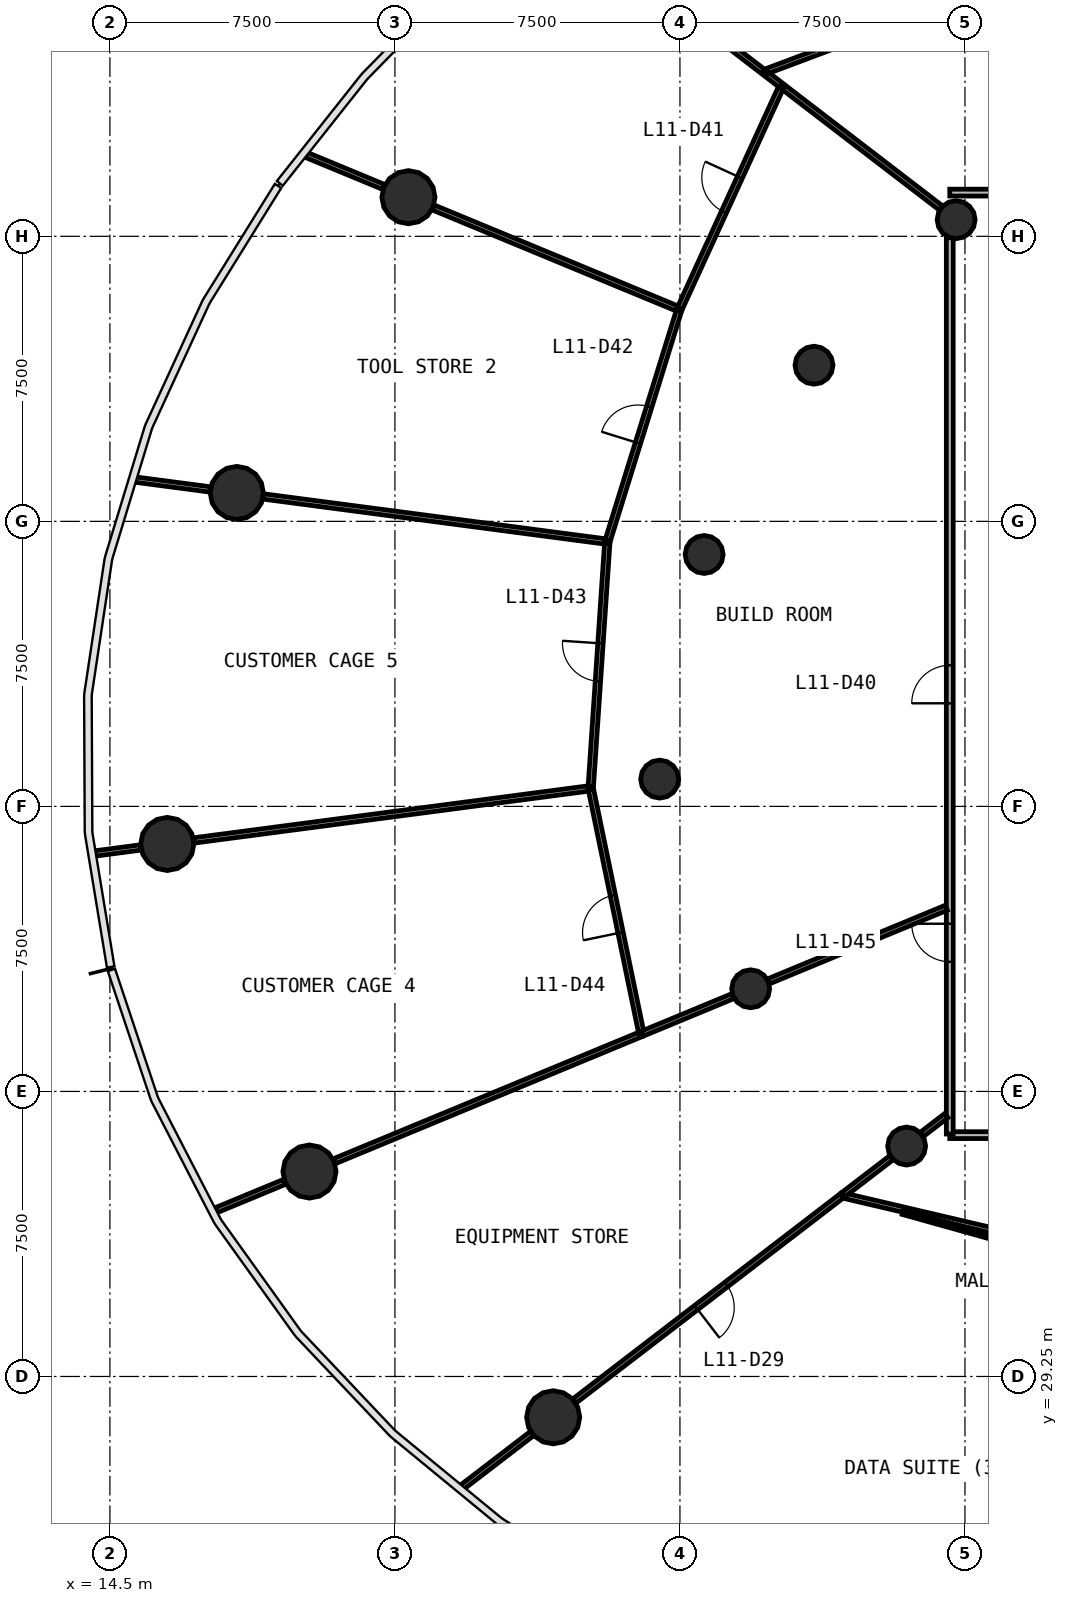
"""IFC4 building model, lengths in metres.
Left out: names, types, materials, properties, quantities, classifications, styles, units other than length and angle.
Written with IfcOpenShell. Run it as: python <this file> out.ifc"""

import sys

from ifc_helpers import new_model, si_unit, direction, frame, frame_2d, origin, origin_2d, place, context, subcontext, project, spatial, rectangle, circle, extrude, source, transform, mapped, element, fill, save


model = new_model("IFC4")
c1 = context("Model", 3, precision=1e-05, world=origin(), true_north=direction((0.0, 1.0)))
c2 = subcontext(c1, "Body", "Model", "MODEL_VIEW")
j1 = project(units=[si_unit("LENGTHUNIT", "METRE"), si_unit("PLANEANGLEUNIT", "RADIAN")], contexts=[c1])
p1 = place(None, origin())
s1 = spatial("IfcSite", under=j1, at=p1, CompositionType="ELEMENT")
p2 = place(p1, origin())
s2 = spatial("IfcBuilding", under=s1, at=p2, CompositionType="ELEMENT")
p3 = place(p2, frame((0.0, 0.0, 49.0)))
s3 = spatial("IfcBuildingStorey", under=s2, at=p3, CompositionType="ELEMENT", Elevation=49.0)
m1 = source(origin(), c2, "Body", "SweptSolid", [
    extrude(circle(Radius=0.7, at=origin_2d()), origin(), (0.0, 0.0, 1.0), 4.4),
])
for number, where, z_axis, x_axis in (
    (1, (22.355, 60.279, 0.0), (0.0, 0.0, 1.0), (1.0, 0.0, 0.0)),
    (2, (17.839, 52.497, 0.0), (0.0, 0.0, 1.0), (1.0, 0.0, 0.0)),
    (3, (16.01, 43.262, 0.0), (0.0, 0.0, 1.0), (1.0, 0.0, 0.0)),
    (4, (19.751, 34.642, 0.0), (0.0, 0.0, 1.0), (1.0, 0.0, 0.0)),
    (5, (26.164, 28.176, 0.0), (0.0, 0.0, 1.0), (1.0, 0.0, 0.0)),
):
    element("IfcColumn", number, at=place(p3, frame(where, z_axis=z_axis, x_axis=x_axis)), inside=s3, PredefinedType="COLUMN", context=c2, shape_type="MappedRepresentation", body=[
        mapped(m1, transform((0.0, 0.0, 0.0), scale=1.0)),
    ])
m2 = source(origin(), c2, "Body", "SweptSolid", [
    extrude(circle(Radius=0.5, at=origin_2d()), origin(), (0.0, 0.0, 1.0), 4.4),
])
for number, where, z_axis, x_axis in (
    (6, (36.768, 59.688, 0.0), (0.0, 0.0, 1.0), (1.0, 0.0, 0.0)),
    (7, (33.028, 55.859, 0.0), (0.0, 0.0, 1.0), (1.0, 0.0, 0.0)),
    (8, (30.137, 50.878, 0.0), (0.0, 0.0, 1.0), (1.0, 0.0, 0.0)),
    (9, (28.966, 44.968, 0.0), (0.0, 0.0, 1.0), (1.0, 0.0, 0.0)),
    (10, (31.361, 39.451, 0.0), (0.0, 0.0, 1.0), (1.0, 0.0, 0.0)),
    (11, (35.465, 35.312, 0.0), (0.0, 0.0, 1.0), (1.0, 0.0, 0.0)),
):
    element("IfcColumn", number, at=place(p3, frame(where, z_axis=z_axis, x_axis=x_axis)), inside=s3, PredefinedType="COLUMN", context=c2, shape_type="MappedRepresentation", body=[
        mapped(m2, transform((0.0, 0.0, 0.0), scale=1.0)),
    ])
p4 = place(p3, frame((67.4, 35.6, 0.0), z_axis=(0.0, 0.0, 1.0), x_axis=(-1.0, 0.0, 0.0)))
e12 = element("IfcWall", 12, at=p4, inside=s3, PredefinedType="PARTITIONING", context=c2, shape_type="SweptSolid", body=[
    extrude(rectangle(XDim=30.8, YDim=0.18, at=frame_2d((15.4, 0.0))), origin(), (0.0, 0.0, 1.0), 3.05),
])
p5 = place(p4, frame((27.45, 0.0, 0.0)))
e13 = element("IfcOpeningElement", 13, at=p5, cuts=e12, PredefinedType="OPENING", context=c2, shape_type="SweptSolid", body=[
    extrude(rectangle(XDim=0.9, YDim=2.1, at=frame_2d((0.45, 1.05))), frame((0.0, 0.1, 0.0), z_axis=(0.0, -1.0, 0.0), x_axis=(1.0, 0.0, 0.0)), (0.0, 0.0, 1.0), 0.2),
])
p6 = place(p4, frame((23.85, 0.0, 0.0)))
e14 = element("IfcOpeningElement", 14, at=p6, cuts=e12, PredefinedType="OPENING", context=c2, shape_type="SweptSolid", body=[
    extrude(rectangle(XDim=0.9, YDim=2.1, at=frame_2d((0.45, 1.05))), frame((0.0, 0.1, 0.0), z_axis=(0.0, -1.0, 0.0), x_axis=(1.0, 0.0, 0.0)), (0.0, 0.0, 1.0), 0.2),
])
p7 = place(p4, frame((20.85, 0.0, 0.0)))
e15 = element("IfcOpeningElement", 15, at=p7, cuts=e12, PredefinedType="OPENING", context=c2, shape_type="SweptSolid", body=[
    extrude(rectangle(XDim=0.9, YDim=2.1, at=frame_2d((0.45, 1.05))), frame((0.0, 0.1, 0.0), z_axis=(0.0, -1.0, 0.0), x_axis=(1.0, 0.0, 0.0)), (0.0, 0.0, 1.0), 0.2),
])
p8 = place(p4, frame((14.95, 0.0, 0.0)))
e16 = element("IfcOpeningElement", 16, at=p8, cuts=e12, PredefinedType="OPENING", context=c2, shape_type="SweptSolid", body=[
    extrude(rectangle(XDim=1.0, YDim=2.1, at=frame_2d((0.5, 1.05))), frame((0.0, 0.1, 0.0), z_axis=(0.0, -1.0, 0.0), x_axis=(1.0, 0.0, 0.0)), (0.0, 0.0, 1.0), 0.2),
])
p9 = place(p3, frame((36.6, 60.4, 0.0), z_axis=(0.0, 0.0, 1.0), x_axis=(1.0, 0.0, 0.0)))
e17 = element("IfcWall", 17, at=p9, inside=s3, PredefinedType="PARTITIONING", context=c2, shape_type="SweptSolid", body=[
    extrude(rectangle(XDim=30.8, YDim=0.18, at=frame_2d((15.4, 0.0))), origin(), (0.0, 0.0, 1.0), 3.05),
])
p10 = place(p9, frame((20.95, 0.0, 0.0)))
e18 = element("IfcOpeningElement", 18, at=p10, cuts=e17, PredefinedType="OPENING", context=c2, shape_type="SweptSolid", body=[
    extrude(rectangle(XDim=1.0, YDim=2.1, at=frame_2d((0.5, 1.05))), frame((0.0, 0.1, 0.0), z_axis=(0.0, -1.0, 0.0), x_axis=(1.0, 0.0, 0.0)), (0.0, 0.0, 1.0), 0.2),
])
p11 = place(p9, frame((17.35, 0.0, 0.0)))
e19 = element("IfcOpeningElement", 19, at=p11, cuts=e17, PredefinedType="OPENING", context=c2, shape_type="SweptSolid", body=[
    extrude(rectangle(XDim=1.0, YDim=2.1, at=frame_2d((0.5, 1.05))), frame((0.0, 0.1, 0.0), z_axis=(0.0, -1.0, 0.0), x_axis=(1.0, 0.0, 0.0)), (0.0, 0.0, 1.0), 0.2),
])
p12 = place(p9, frame((14.95, 0.0, 0.0)))
e20 = element("IfcOpeningElement", 20, at=p12, cuts=e17, PredefinedType="OPENING", context=c2, shape_type="SweptSolid", body=[
    extrude(rectangle(XDim=1.0, YDim=2.1, at=frame_2d((0.5, 1.05))), frame((0.0, 0.1, 0.0), z_axis=(0.0, -1.0, 0.0), x_axis=(1.0, 0.0, 0.0)), (0.0, 0.0, 1.0), 0.2),
])
p13 = place(p3, frame((36.6, 35.63, 0.0), z_axis=(0.0, 0.0, 1.0), x_axis=(0.0, 1.0, 0.0)))
e21 = element("IfcWall", 21, at=p13, inside=s3, PredefinedType="PARTITIONING", context=c2, shape_type="SweptSolid", body=[
    extrude(rectangle(XDim=23.583, YDim=0.18, at=frame_2d((11.791, 0.0))), origin(), (0.0, 0.0, 1.0), 3.05),
])
p14 = place(p13, frame((11.333, 0.0, 0.0)))
e22 = element("IfcOpeningElement", 22, at=p14, cuts=e21, PredefinedType="OPENING", context=c2, shape_type="SweptSolid", body=[
    extrude(rectangle(XDim=1.0, YDim=2.1, at=frame_2d((0.5, 1.05))), frame((0.0, 0.1, 0.0), z_axis=(0.0, -1.0, 0.0), x_axis=(1.0, 0.0, 0.0)), (0.0, 0.0, 1.0), 0.2),
])
p15 = place(p13, frame((4.532, 0.0, 0.0)))
e23 = element("IfcOpeningElement", 23, at=p15, cuts=e21, PredefinedType="OPENING", context=c2, shape_type="SweptSolid", body=[
    extrude(rectangle(XDim=1.0, YDim=2.1, at=frame_2d((0.5, 1.05))), frame((0.0, 0.1, 0.0), z_axis=(0.0, -1.0, 0.0), x_axis=(1.0, 0.0, 0.0)), (0.0, 0.0, 1.0), 0.2),
])
p16 = place(p3, frame((27.151, 44.729, 0.0), z_axis=(0.0, 0.0, 1.0), x_axis=(-0.991445773007, -0.130519267494, 0.0)))
e24 = element("IfcWall", 24, at=p16, inside=s3, PredefinedType="PARTITIONING", context=c2, shape_type="SweptSolid", body=[
    extrude(rectangle(XDim=10.533, YDim=0.14, at=frame_2d((5.267, 0.0))), origin(), (0.0, 0.0, 1.0), 3.05),
])
p17 = place(p3, frame((27.59, 51.214, 0.0), z_axis=(0.0, 0.0, 1.0), x_axis=(-0.991443735441, 0.13053474424, 0.0)))
e25 = element("IfcWall", 25, at=p17, inside=s3, PredefinedType="PARTITIONING", context=c2, shape_type="SweptSolid", body=[
    extrude(rectangle(XDim=9.131, YDim=0.14, at=frame_2d((4.565, 0.0))), origin(), (0.0, 0.0, 1.0), 3.05),
])
p18 = place(p3, frame((33.776, 34.016, 0.0), z_axis=(0.0, 0.0, 1.0), x_axis=(-0.793363616038, -0.608748037161, 0.0)))
e26 = element("IfcWall", 26, at=p18, inside=s3, PredefinedType="PARTITIONING", context=c2, shape_type="SweptSolid", body=[
    extrude(rectangle(XDim=8.889, YDim=0.14, at=frame_2d((4.445, 0.0))), origin(), (0.0, 0.0, 1.0), 3.05),
])
p19 = place(p18, frame((3.85, 0.0, 0.0)))
e27 = element("IfcOpeningElement", 27, at=p19, cuts=e26, PredefinedType="OPENING", context=c2, shape_type="SweptSolid", body=[
    extrude(rectangle(XDim=1.0, YDim=2.1, at=frame_2d((0.5, 1.05))), frame((0.0, 0.08, 0.0), z_axis=(0.0, -1.0, 0.0), x_axis=(1.0, 0.0, 0.0)), (0.0, 0.0, 1.0), 0.16),
])
p20 = place(p3, frame((28.489, 38.261, 0.0), z_axis=(0.0, 0.0, 1.0), x_axis=(-0.923879491354, -0.382683531727, 0.0)))
e28 = element("IfcWall", 28, at=p20, inside=s3, PredefinedType="PARTITIONING", context=c2, shape_type="SweptSolid", body=[
    extrude(rectangle(XDim=8.753, YDim=0.14, at=frame_2d((4.376, 0.0))), origin(), (0.0, 0.0, 1.0), 3.05),
])
p21 = place(p3, frame((29.484, 57.326, 0.0), z_axis=(0.0, 0.0, 1.0), x_axis=(-0.923878476662, 0.3826859814, 0.0)))
e29 = element("IfcWall", 29, at=p21, inside=s3, PredefinedType="PARTITIONING", context=c2, shape_type="SweptSolid", body=[
    extrude(rectangle(XDim=7.011, YDim=0.14, at=frame_2d((3.506, 0.0))), origin(), (0.0, 0.0, 1.0), 3.05),
])
p22 = place(p3, frame((38.19, 65.998, 0.0), z_axis=(0.0, 0.0, 1.0), x_axis=(-0.936297270661, -0.35120851492, 0.0)))
e30 = element("IfcWall", 30, at=p22, inside=s3, PredefinedType="PARTITIONING", context=c2, shape_type="SweptSolid", body=[
    extrude(rectangle(XDim=6.919, YDim=0.14, at=frame_2d((3.459, 0.0))), origin(), (0.0, 0.0, 1.0), 3.05),
])
p23 = place(p3, frame((28.483, 38.291, 0.0), z_axis=(0.0, 0.0, 1.0), x_axis=(-0.202647546794, 0.979251740758, 0.0)))
e31 = element("IfcWall", 31, at=p23, inside=s3, PredefinedType="PARTITIONING", context=c2, shape_type="SweptSolid", body=[
    extrude(rectangle(XDim=6.544, YDim=0.14, at=frame_2d((3.272, 0.0))), origin(), (0.0, 0.0, 1.0), 3.05),
])
p24 = place(p23, frame((2.694, 0.0, 0.0)))
e32 = element("IfcOpeningElement", 32, at=p24, cuts=e31, PredefinedType="OPENING", context=c2, shape_type="SweptSolid", body=[
    extrude(rectangle(XDim=1.0, YDim=2.1, at=frame_2d((0.5, 1.05))), frame((0.0, 0.08, 0.0), z_axis=(0.0, -1.0, 0.0), x_axis=(1.0, 0.0, 0.0)), (0.0, 0.0, 1.0), 0.16),
])
p25 = place(p3, frame((27.153, 44.759, 0.0), z_axis=(0.0, 0.0, 1.0), x_axis=(0.067555628739, 0.997715509063, 0.0)))
e33 = element("IfcWall", 33, at=p25, inside=s3, PredefinedType="PARTITIONING", context=c2, shape_type="SweptSolid", body=[
    extrude(rectangle(XDim=6.44, YDim=0.14, at=frame_2d((3.22, 0.0))), origin(), (0.0, 0.0, 1.0), 3.05),
])
p26 = place(p25, frame((2.79, 0.0, 0.0)))
e34 = element("IfcOpeningElement", 34, at=p26, cuts=e33, PredefinedType="OPENING", context=c2, shape_type="SweptSolid", body=[
    extrude(rectangle(XDim=1.0, YDim=2.1, at=frame_2d((0.5, 1.05))), frame((0.0, 0.08, 0.0), z_axis=(0.0, -1.0, 0.0), x_axis=(1.0, 0.0, 0.0)), (0.0, 0.0, 1.0), 0.16),
])
p27 = place(p3, frame((29.497, 57.354, 0.0), z_axis=(0.0, 0.0, 1.0), x_axis=(0.416308805512, 0.909223283057, 0.0)))
e35 = element("IfcWall", 35, at=p27, inside=s3, PredefinedType="PARTITIONING", context=c2, shape_type="SweptSolid", body=[
    extrude(rectangle(XDim=6.441, YDim=0.14, at=frame_2d((3.22, 0.0))), origin(), (0.0, 0.0, 1.0), 3.05),
])
p28 = place(p27, frame((2.791, 0.0, 0.0)))
e36 = element("IfcOpeningElement", 36, at=p28, cuts=e35, PredefinedType="OPENING", context=c2, shape_type="SweptSolid", body=[
    extrude(rectangle(XDim=1.0, YDim=2.1, at=frame_2d((0.5, 1.05))), frame((0.0, 0.08, 0.0), z_axis=(0.0, -1.0, 0.0), x_axis=(1.0, 0.0, 0.0)), (0.0, 0.0, 1.0), 0.16),
])
p29 = place(p3, frame((27.599, 51.242, 0.0), z_axis=(0.0, 0.0, 1.0), x_axis=(0.296066096507, 0.95516745469, 0.0)))
e37 = element("IfcWall", 37, at=p29, inside=s3, PredefinedType="PARTITIONING", context=c2, shape_type="SweptSolid", body=[
    extrude(rectangle(XDim=6.34, YDim=0.14, at=frame_2d((3.17, 0.0))), origin(), (0.0, 0.0, 1.0), 3.05),
])
p30 = place(p29, frame((2.689, 0.0, 0.0)))
e38 = element("IfcOpeningElement", 38, at=p30, cuts=e37, PredefinedType="OPENING", context=c2, shape_type="SweptSolid", body=[
    extrude(rectangle(XDim=1.0, YDim=2.1, at=frame_2d((0.5, 1.05))), frame((0.0, 0.08, 0.0), z_axis=(0.0, -1.0, 0.0), x_axis=(1.0, 0.0, 0.0)), (0.0, 0.0, 1.0), 0.16),
])
p31 = place(p3, frame((33.805, 34.009, 0.0), z_axis=(0.0, 0.0, 1.0), x_axis=(0.973632222489, -0.22812342127, 0.0)))
e39 = element("IfcWall", 39, at=p31, inside=s3, PredefinedType="PARTITIONING", context=c2, shape_type="SweptSolid", body=[
    extrude(rectangle(XDim=6.018, YDim=0.14, at=frame_2d((3.009, 0.0))), origin(), (0.0, 0.0, 1.0), 3.05),
])
p32 = place(p3, frame((36.367, 59.995, 0.0), z_axis=(0.0, 0.0, 1.0), x_axis=(-0.793353550187, 0.608761155467, 0.0)))
e40 = element("IfcWall", 40, at=p32, inside=s3, PredefinedType="PARTITIONING", context=c2, shape_type="SweptSolid", body=[
    extrude(rectangle(XDim=5.208, YDim=0.14, at=frame_2d((2.604, 0.0))), origin(), (0.0, 0.0, 1.0), 3.05),
])
p33 = place(p3, frame((36.51, 41.584, 0.0), z_axis=(0.0, 0.0, 1.0), x_axis=(-0.923890025086, -0.382658100067, 0.0)))
e41 = element("IfcWall", 41, at=p33, inside=s3, PredefinedType="PARTITIONING", context=c2, shape_type="SweptSolid", body=[
    extrude(rectangle(XDim=5.068, YDim=0.14, at=frame_2d((2.534, 0.0))), origin(), (0.0, 0.0, 1.0), 3.05),
])
p34 = place(p3, frame((31.688, 63.586, 0.0), z_axis=(0.0, 0.0, 1.0), x_axis=(-0.793375408023, 0.608732668701, 0.0)))
e42 = element("IfcWall", 42, at=p34, inside=s3, PredefinedType="PARTITIONING", context=c2, shape_type="SweptSolid", body=[
    extrude(rectangle(XDim=3.693, YDim=0.14, at=frame_2d((1.847, 0.0))), origin(), (0.0, 0.0, 1.0), 3.05),
])
p35 = place(p3, frame((30.894, 39.258, 0.0), z_axis=(0.0, 0.0, 1.0), x_axis=(-0.923866506459, -0.382714878523, 0.0)))
e43 = element("IfcWall", 43, at=p35, inside=s3, PredefinedType="PARTITIONING", context=c2, shape_type="SweptSolid", body=[
    extrude(rectangle(XDim=2.573, YDim=0.14, at=frame_2d((1.287, 0.0))), origin(), (0.0, 0.0, 1.0), 3.05),
])
p36 = place(p3, frame((25.606, 27.747, 0.0), z_axis=(0.0, 0.0, 1.0), x_axis=(-0.793384830347, -0.608720388172, 0.0)))
e44 = element("IfcWall", 44, at=p36, inside=s3, PredefinedType="PARTITIONING", context=c2, shape_type="SweptSolid", body=[
    extrude(rectangle(XDim=2.324, YDim=0.14, at=frame_2d((1.162, 0.0))), origin(), (0.0, 0.0, 1.0), 3.05),
])
p37 = place(p3, frame((21.704, 60.549, 0.0), z_axis=(0.0, 0.0, 1.0), x_axis=(-0.923899948789, 0.382634139392, 0.0)))
e45 = element("IfcWall", 45, at=p37, inside=s3, PredefinedType="PARTITIONING", context=c2, shape_type="SweptSolid", body=[
    extrude(rectangle(XDim=2.215, YDim=0.14, at=frame_2d((1.107, 0.0))), origin(), (0.0, 0.0, 1.0), 3.05),
])
p38 = place(p3, frame((17.141, 52.589, 0.0), z_axis=(0.0, 0.0, 1.0), x_axis=(-0.991443960057, 0.130533038219, 0.0)))
e46 = element("IfcWall", 46, at=p38, inside=s3, PredefinedType="PARTITIONING", context=c2, shape_type="SweptSolid", body=[
    extrude(rectangle(XDim=2.01, YDim=0.14, at=frame_2d((1.005, 0.0))), origin(), (0.0, 0.0, 1.0), 3.05),
])
p39 = place(p3, frame((19.1, 34.372, 0.0), z_axis=(0.0, 0.0, 1.0), x_axis=(-0.923874199787, -0.382696306447, 0.0)))
e47 = element("IfcWall", 47, at=p39, inside=s3, PredefinedType="PARTITIONING", context=c2, shape_type="SweptSolid", body=[
    extrude(rectangle(XDim=1.961, YDim=0.14, at=frame_2d((0.98, 0.0))), origin(), (0.0, 0.0, 1.0), 3.05),
])
p40 = place(p3, frame((35.065, 35.005, 0.0), z_axis=(0.0, 0.0, 1.0), x_axis=(-0.793286864057, -0.608848052732, 0.0)))
e48 = element("IfcWall", 48, at=p40, inside=s3, PredefinedType="PARTITIONING", context=c2, shape_type="SweptSolid", body=[
    extrude(rectangle(XDim=1.587, YDim=0.14, at=frame_2d((0.793, 0.0))), origin(), (0.0, 0.0, 1.0), 3.05),
])
p41 = place(p3, frame((15.311, 43.17, 0.0), z_axis=(0.0, 0.0, 1.0), x_axis=(-0.991424298155, -0.130682290411, 0.0)))
e49 = element("IfcWall", 49, at=p41, inside=s3, PredefinedType="PARTITIONING", context=c2, shape_type="SweptSolid", body=[
    extrude(rectangle(XDim=1.22, YDim=0.14, at=frame_2d((0.61, 0.0))), origin(), (0.0, 0.0, 1.0), 3.05),
])
p42 = place(p3, frame((36.51, 36.114, 0.0), z_axis=(0.0, 0.0, 1.0), x_axis=(-0.793316076519, -0.608809989025, 0.0)))
e50 = element("IfcWall", 50, at=p42, inside=s3, PredefinedType="PARTITIONING", context=c2, shape_type="SweptSolid", body=[
    extrude(rectangle(XDim=0.812, YDim=0.14, at=frame_2d((0.406, 0.0))), origin(), (0.0, 0.0, 1.0), 3.05),
])
p43 = place(p3, frame((32.155, 63.228, 0.0), z_axis=(0.0, 0.0, 1.0), x_axis=(-0.793176766219, 0.608991475745, 0.0)))
e51 = element("IfcWall", 51, at=p43, inside=s3, PredefinedType="PARTITIONING", context=c2, shape_type="SweptSolid", body=[
    extrude(rectangle(XDim=0.476, YDim=0.14, at=frame_2d((0.238, 0.0))), origin(), (0.0, 0.0, 1.0), 3.05),
])
p44 = place(p3, frame((35.364, 33.572, 0.0), z_axis=(0.0, 0.0, 1.0), x_axis=(0.963049305084, -0.269325149172, 0.0)))
e52 = element("IfcWall", 52, at=p44, inside=s3, PredefinedType="PARTITIONING", context=c2, shape_type="SweptSolid", body=[
    extrude(rectangle(XDim=2.823, YDim=0.12, at=frame_2d((1.411, 0.0))), origin(), (0.0, 0.0, 1.0), 3.05),
])
m3 = source(origin(), c2, "Body", "SweptSolid", [
    extrude(rectangle(XDim=1.0, YDim=2.1, at=frame_2d((0.5, 1.05))), frame((0.0, 0.025, 0.0), z_axis=(0.0, -1.0, 0.0), x_axis=(1.0, 0.0, 0.0)), (0.0, 0.0, 1.0), 0.05),
])
p45 = place(p19, origin())
e53 = element("IfcDoor", 53, at=p45, inside=s3, OperationType="SINGLE_SWING_RIGHT", PredefinedType="DOOR", context=c2, shape_type="MappedRepresentation", body=[
    mapped(m3, transform((0.0, 0.0, 0.0), scale=1.0)),
])
fill(e27, e53)
p46 = place(p14, origin())
e54 = element("IfcDoor", 54, at=p46, inside=s3, OperationType="SINGLE_SWING_LEFT", PredefinedType="DOOR", context=c2, shape_type="MappedRepresentation", body=[
    mapped(m3, transform((0.0, 0.0, 0.0), scale=1.0)),
])
fill(e22, e54)
p47 = place(p28, origin())
e55 = element("IfcDoor", 55, at=p47, inside=s3, OperationType="SINGLE_SWING_RIGHT", PredefinedType="DOOR", context=c2, shape_type="MappedRepresentation", body=[
    mapped(m3, transform((0.0, 0.0, 0.0), scale=1.0)),
])
fill(e36, e55)
p48 = place(p30, origin())
e56 = element("IfcDoor", 56, at=p48, inside=s3, OperationType="SINGLE_SWING_LEFT", PredefinedType="DOOR", context=c2, shape_type="MappedRepresentation", body=[
    mapped(m3, transform((0.0, 0.0, 0.0), scale=1.0)),
])
fill(e38, e56)
p49 = place(p26, origin())
e57 = element("IfcDoor", 57, at=p49, inside=s3, OperationType="SINGLE_SWING_RIGHT", PredefinedType="DOOR", context=c2, shape_type="MappedRepresentation", body=[
    mapped(m3, transform((0.0, 0.0, 0.0), scale=1.0)),
])
fill(e34, e57)
p50 = place(p24, origin())
e58 = element("IfcDoor", 58, at=p50, inside=s3, OperationType="SINGLE_SWING_LEFT", PredefinedType="DOOR", context=c2, shape_type="MappedRepresentation", body=[
    mapped(m3, transform((0.0, 0.0, 0.0), scale=1.0)),
])
fill(e32, e58)
p51 = place(p15, origin())
e59 = element("IfcDoor", 59, at=p51, inside=s3, OperationType="SINGLE_SWING_RIGHT", PredefinedType="DOOR", context=c2, shape_type="MappedRepresentation", body=[
    mapped(m3, transform((0.0, 0.0, 0.0), scale=1.0)),
])
fill(e23, e59)
save(model, sys.argv[1])
